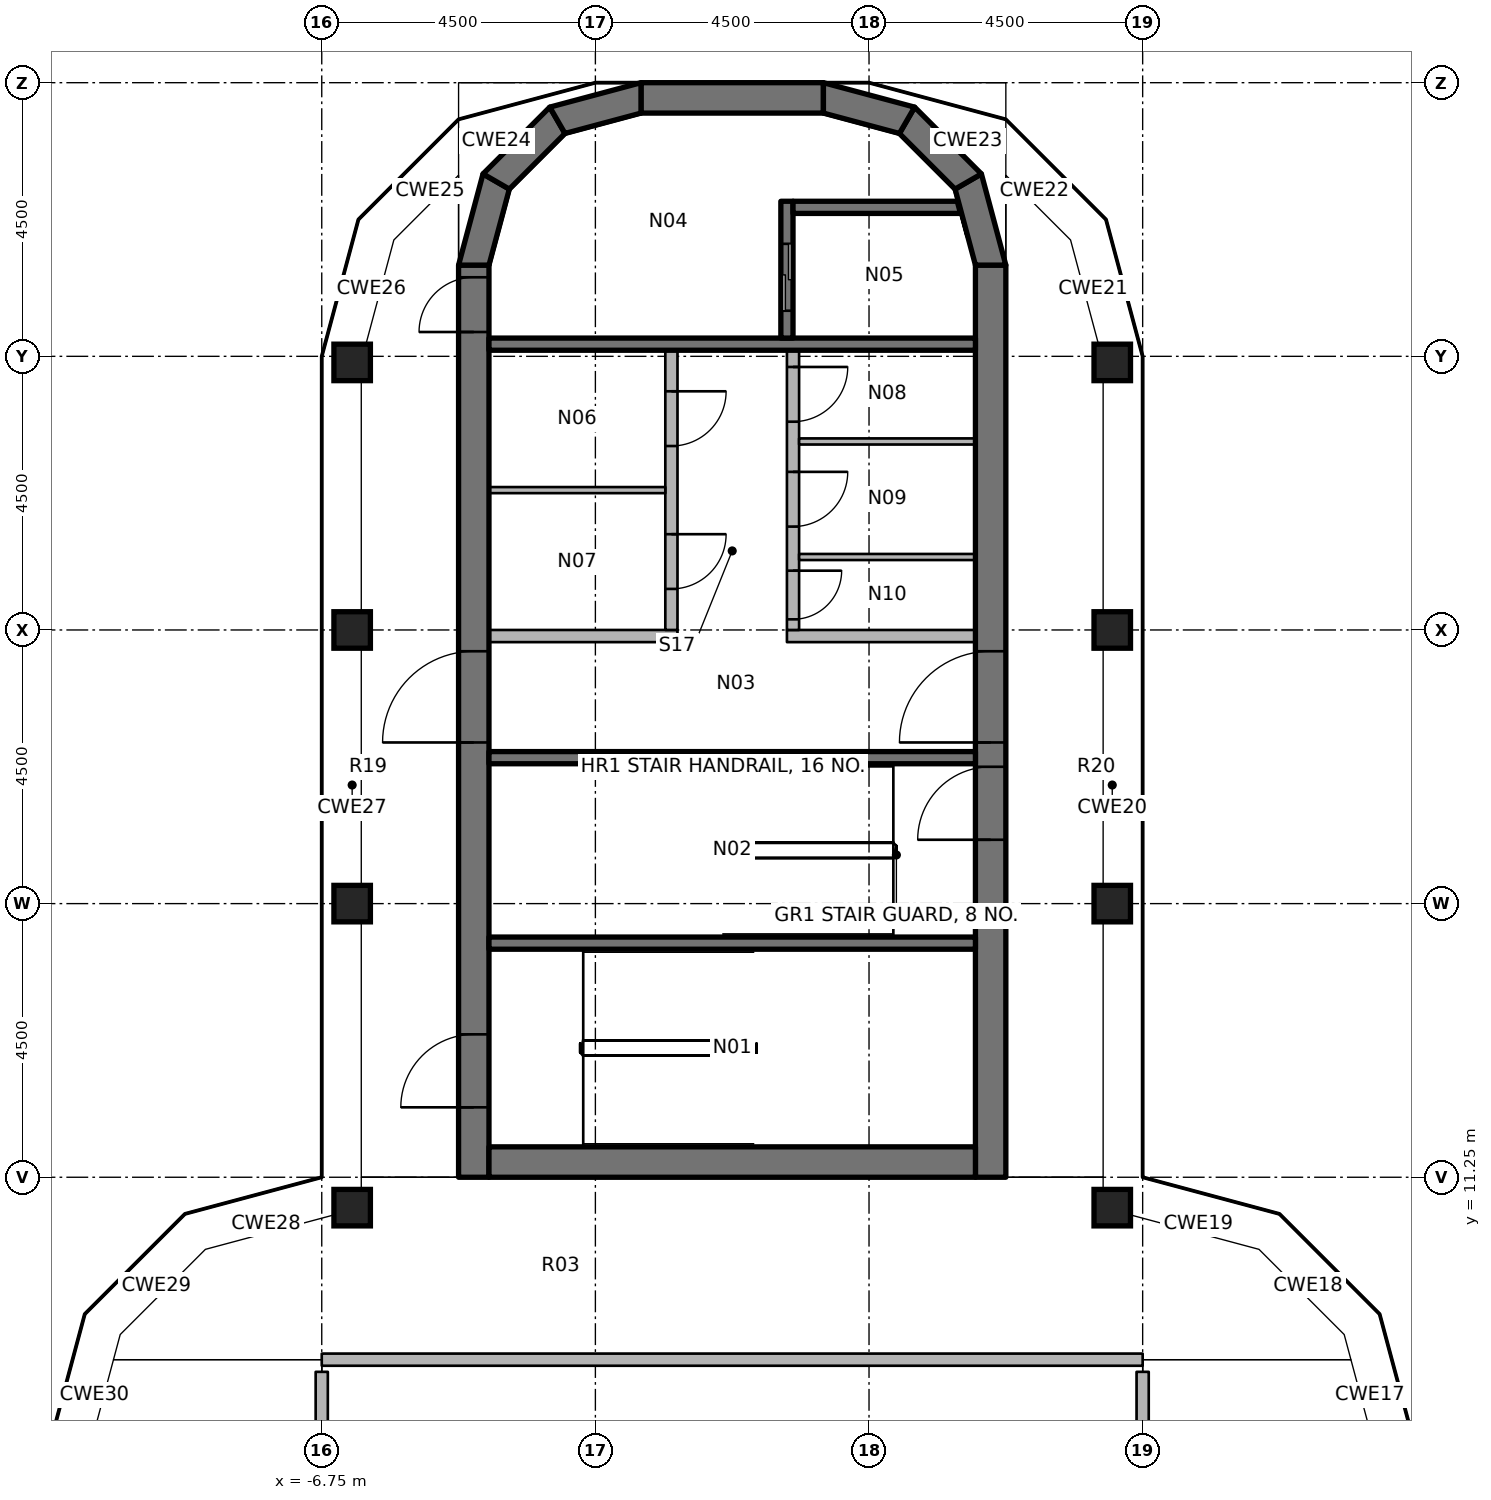
"""IFC4 building model, lengths in metres.
Left out: names, types, materials, properties, quantities, classifications, styles, units other than length and angle.
Written with IfcOpenShell. Run it as: python <this file> out.ifc"""

import sys

from ifc_helpers import new_model, si_unit, direction, frame, frame_2d, origin, origin_2d, place, context, subcontext, project, spatial, polyline, rectangle, outline, extrude, element, fill, save


model = new_model("IFC4")
c1 = context("Model", 3, precision=1e-05, world=origin(), true_north=direction((0.0, 1.0)))
c2 = subcontext(c1, "Body", "Model", "MODEL_VIEW")
j1 = project(units=[si_unit("LENGTHUNIT", "METRE"), si_unit("PLANEANGLEUNIT", "RADIAN")], contexts=[c1])
p1 = place(None, origin())
s1 = spatial("IfcSite", under=j1, at=p1, CompositionType="ELEMENT")
p2 = place(p1, origin())
s2 = spatial("IfcBuilding", under=s1, at=p2, CompositionType="ELEMENT")
p3 = place(p2, frame((0.0, 0.0, 284.0)))
s3 = spatial("IfcBuildingStorey", under=s2, at=p3, CompositionType="ELEMENT", Elevation=284.0)
for number, where, z_axis, x_axis in (
    (1, (-6.25, 10.75, 0.0), (0.0, 0.0, 1.0), (1.0, 0.0, 0.0)),
    (2, (-6.25, 15.75, 0.0), (0.0, 0.0, 1.0), (1.0, 0.0, 0.0)),
    (3, (-6.25, 20.25, 0.0), (0.0, 0.0, 1.0), (1.0, 0.0, 0.0)),
    (4, (-6.25, 24.65, 0.0), (0.0, 0.0, 1.0), (1.0, 0.0, 0.0)),
    (5, (6.25, 10.75, 0.0), (0.0, 0.0, 1.0), (1.0, 0.0, 0.0)),
    (6, (6.25, 15.75, 0.0), (0.0, 0.0, 1.0), (1.0, 0.0, 0.0)),
    (7, (6.25, 20.25, 0.0), (0.0, 0.0, 1.0), (1.0, 0.0, 0.0)),
    (8, (6.25, 24.65, 0.0), (0.0, 0.0, 1.0), (1.0, 0.0, 0.0)),
):
    element("IfcColumn", number, at=place(p3, frame(where, z_axis=z_axis, x_axis=x_axis)), inside=s3, PredefinedType="COLUMN", context=c2, shape_type="SweptSolid", body=[
        extrude(rectangle(XDim=0.6, YDim=0.6, at=origin_2d()), origin(), (0.0, 0.0, 1.0), 7.45),
    ])
p4 = place(p3, frame((-4.25, 11.25, 0.0), z_axis=(0.0, 0.0, 1.0), x_axis=(0.0, 1.0, 0.0)))
e9 = element("IfcWall", 9, at=p4, inside=s3, PredefinedType="SHEAR", context=c2, shape_type="SweptSolid", body=[
    extrude(rectangle(XDim=15.0, YDim=0.5, at=frame_2d((7.5, 0.0))), origin(), (0.0, 0.0, 1.0), 7.6),
])
p5 = place(p4, frame((7.15, 0.0, 0.0)))
e10 = element("IfcOpeningElement", 10, at=p5, cuts=e9, PredefinedType="OPENING", context=c2, shape_type="SweptSolid", body=[
    extrude(rectangle(XDim=1.5, YDim=2.3, at=frame_2d((0.75, 1.15))), frame((0.0, 0.26, 0.0), z_axis=(0.0, -1.0, 0.0), x_axis=(1.0, 0.0, 0.0)), (0.0, 0.0, 1.0), 0.52),
])
p6 = place(p4, frame((13.9, 0.0, 0.0)))
e11 = element("IfcOpeningElement", 11, at=p6, cuts=e9, PredefinedType="OPENING", context=c2, shape_type="SweptSolid", body=[
    extrude(rectangle(XDim=0.9, YDim=2.1, at=frame_2d((0.45, 1.05))), frame((0.0, 0.26, 0.0), z_axis=(0.0, -1.0, 0.0), x_axis=(1.0, 0.0, 0.0)), (0.0, 0.0, 1.0), 0.52),
])
p7 = place(p4, frame((1.15, 0.0, 0.0)))
e12 = element("IfcOpeningElement", 12, at=p7, cuts=e9, PredefinedType="OPENING", context=c2, shape_type="SweptSolid", body=[
    extrude(rectangle(XDim=1.2, YDim=2.1, at=frame_2d((0.6, 1.05))), frame((0.0, 0.26, 0.0), z_axis=(0.0, -1.0, 0.0), x_axis=(1.0, 0.0, 0.0)), (0.0, 0.0, 1.0), 0.52),
])
p8 = place(p3, frame((4.25, 11.25, 0.0), z_axis=(0.0, 0.0, 1.0), x_axis=(0.0, 1.0, 0.0)))
e13 = element("IfcWall", 13, at=p8, inside=s3, PredefinedType="SHEAR", context=c2, shape_type="SweptSolid", body=[
    extrude(rectangle(XDim=15.0, YDim=0.5, at=frame_2d((7.5, 0.0))), origin(), (0.0, 0.0, 1.0), 7.6),
])
p9 = place(p8, frame((7.15, 0.0, 0.0)))
e14 = element("IfcOpeningElement", 14, at=p9, cuts=e13, PredefinedType="OPENING", context=c2, shape_type="SweptSolid", body=[
    extrude(rectangle(XDim=1.5, YDim=2.3, at=frame_2d((0.75, 1.15))), frame((0.0, 0.26, 0.0), z_axis=(0.0, -1.0, 0.0), x_axis=(1.0, 0.0, 0.0)), (0.0, 0.0, 1.0), 0.52),
])
p10 = place(p8, frame((5.55, 0.0, 0.0)))
e15 = element("IfcOpeningElement", 15, at=p10, cuts=e13, PredefinedType="OPENING", context=c2, shape_type="SweptSolid", body=[
    extrude(rectangle(XDim=1.2, YDim=2.1, at=frame_2d((0.6, 1.05))), frame((0.0, 0.26, 0.0), z_axis=(0.0, -1.0, 0.0), x_axis=(1.0, 0.0, 0.0)), (0.0, 0.0, 1.0), 0.52),
])
p11 = place(p3, frame((-4.0, 11.5, 0.0), z_axis=(0.0, 0.0, 1.0), x_axis=(1.0, 0.0, 0.0)))
e16 = element("IfcWall", 16, at=p11, inside=s3, PredefinedType="SHEAR", context=c2, shape_type="SweptSolid", body=[
    extrude(rectangle(XDim=8.0, YDim=0.5, at=frame_2d((4.0, 0.0))), origin(), (0.0, 0.0, 1.0), 7.6),
])
p12 = place(p3, frame((-1.5, 29.0, 0.0), z_axis=(0.0, 0.0, 1.0), x_axis=(1.0, 0.0, 0.0)))
e17 = element("IfcWall", 17, at=p12, inside=s3, PredefinedType="SHEAR", context=c2, shape_type="SweptSolid", body=[
    extrude(rectangle(XDim=3.0, YDim=0.5, at=frame_2d((1.5, 0.0))), origin(), (0.0, 0.0, 1.0), 7.6),
])
p13 = place(p3, origin())
e18 = element("IfcWall", 18, at=p13, inside=s3, PredefinedType="SHEAR", context=c2, shape_type="SweptSolid", body=[
    extrude(outline(polyline([(-4.5, 26.25), (-4.098, 27.75), (-3.665, 27.5), (-4.0, 26.25), (-4.5, 26.25)])), origin(), (0.0, 0.0, 1.0), 7.6),
])
p14 = place(p3, origin())
e19 = element("IfcWall", 19, at=p14, inside=s3, PredefinedType="SHEAR", context=c2, shape_type="SweptSolid", body=[
    extrude(outline(polyline([(-4.098, 27.75), (-3.0, 28.848), (-2.75, 28.415), (-3.665, 27.5), (-4.098, 27.75)])), origin(), (0.0, 0.0, 1.0), 7.6),
])
p15 = place(p3, origin())
e20 = element("IfcWall", 20, at=p15, inside=s3, PredefinedType="SHEAR", context=c2, shape_type="SweptSolid", body=[
    extrude(outline(polyline([(-3.0, 28.848), (-1.5, 29.25), (-1.5, 28.75), (-2.75, 28.415), (-3.0, 28.848)])), origin(), (0.0, 0.0, 1.0), 7.6),
])
p16 = place(p3, origin())
e21 = element("IfcWall", 21, at=p16, inside=s3, PredefinedType="SHEAR", context=c2, shape_type="SweptSolid", body=[
    extrude(outline(polyline([(4.5, 26.25), (4.098, 27.75), (3.665, 27.5), (4.0, 26.25), (4.5, 26.25)])), origin(), (0.0, 0.0, 1.0), 7.6),
])
p17 = place(p3, origin())
e22 = element("IfcWall", 22, at=p17, inside=s3, PredefinedType="SHEAR", context=c2, shape_type="SweptSolid", body=[
    extrude(outline(polyline([(4.098, 27.75), (3.0, 28.848), (2.75, 28.415), (3.665, 27.5), (4.098, 27.75)])), origin(), (0.0, 0.0, 1.0), 7.6),
])
p18 = place(p3, origin())
e23 = element("IfcWall", 23, at=p18, inside=s3, PredefinedType="SHEAR", context=c2, shape_type="SweptSolid", body=[
    extrude(outline(polyline([(3.0, 28.848), (1.5, 29.25), (1.5, 28.75), (2.75, 28.415), (3.0, 28.848)])), origin(), (0.0, 0.0, 1.0), 7.6),
])
p19 = place(p3, frame((-4.0, 24.95, 0.0), z_axis=(0.0, 0.0, 1.0), x_axis=(1.0, 0.0, 0.0)))
e24 = element("IfcWall", 24, at=p19, inside=s3, PredefinedType="SHEAR", context=c2, shape_type="SweptSolid", body=[
    extrude(rectangle(XDim=8.0, YDim=0.2, at=frame_2d((4.0, 0.0))), origin(), (0.0, 0.0, 1.0), 7.45),
])
p20 = place(p3, frame((0.9, 27.3, 0.0), z_axis=(0.0, 0.0, 1.0), x_axis=(0.0, -1.0, 0.0)))
e25 = element("IfcWall", 25, at=p20, inside=s3, PredefinedType="SHEAR", context=c2, shape_type="SweptSolid", body=[
    extrude(rectangle(XDim=2.25, YDim=0.2, at=frame_2d((1.125, 0.0))), origin(), (0.0, 0.0, 1.0), 7.45),
])
p21 = place(p20, frame((0.7, 0.0, 0.0)))
e26 = element("IfcOpeningElement", 26, at=p21, cuts=e25, PredefinedType="OPENING", context=c2, shape_type="SweptSolid", body=[
    extrude(rectangle(XDim=1.1, YDim=2.3, at=frame_2d((0.55, 1.15))), frame((0.0, 0.11, 0.0), z_axis=(0.0, -1.0, 0.0), x_axis=(1.0, 0.0, 0.0)), (0.0, 0.0, 1.0), 0.22),
])
p22 = place(p3, origin())
e27 = element("IfcWall", 27, at=p22, inside=s3, PredefinedType="SHEAR", context=c2, shape_type="SweptSolid", body=[
    extrude(outline(polyline([(1.0, 27.1), (3.755, 27.1), (3.701, 27.3), (1.0, 27.3), (1.0, 27.1)])), origin(), (0.0, 0.0, 1.0), 7.45),
])
for number, where, z_axis, x_axis in (
    (28, (-4.0, 18.15, 0.0), (0.0, 0.0, 1.0), (1.0, 0.0, 0.0)),
    (29, (-4.0, 15.1, 0.0), (0.0, 0.0, 1.0), (1.0, 0.0, 0.0)),
):
    element("IfcWall", number, at=place(p3, frame(where, z_axis=z_axis, x_axis=x_axis)), inside=s3, PredefinedType="SHEAR", context=c2, shape_type="SweptSolid", body=[
        extrude(rectangle(XDim=8.0, YDim=0.2, at=frame_2d((4.0, 0.0))), origin(), (0.0, 0.0, 1.0), 7.45),
    ])
p23 = place(p3, frame((-4.0, 20.15, 0.0), z_axis=(0.0, 0.0, 1.0), x_axis=(1.0, 0.0, 0.0)))
e30 = element("IfcWall", 30, at=p23, inside=s3, PredefinedType="PARTITIONING", context=c2, shape_type="SweptSolid", body=[
    extrude(rectangle(XDim=3.1, YDim=0.2, at=frame_2d((1.55, 0.0))), origin(), (0.0, 0.0, 1.0), 7.45),
])
p24 = place(p3, frame((-1.0, 24.85, 0.0), z_axis=(0.0, 0.0, 1.0), x_axis=(0.0, -1.0, 0.0)))
e31 = element("IfcWall", 31, at=p24, inside=s3, PredefinedType="PARTITIONING", context=c2, shape_type="SweptSolid", body=[
    extrude(rectangle(XDim=4.6, YDim=0.2, at=frame_2d((2.3, 0.0))), origin(), (0.0, 0.0, 1.0), 7.45),
])
p25 = place(p24, frame((0.675, 0.0, 0.0)))
e32 = element("IfcOpeningElement", 32, at=p25, cuts=e31, PredefinedType="OPENING", context=c2, shape_type="SweptSolid", body=[
    extrude(rectangle(XDim=0.9, YDim=2.1, at=frame_2d((0.45, 1.05))), frame((0.0, 0.11, 0.0), z_axis=(0.0, -1.0, 0.0), x_axis=(1.0, 0.0, 0.0)), (0.0, 0.0, 1.0), 0.22),
])
p26 = place(p24, frame((3.025, 0.0, 0.0)))
e33 = element("IfcOpeningElement", 33, at=p26, cuts=e31, PredefinedType="OPENING", context=c2, shape_type="SweptSolid", body=[
    extrude(rectangle(XDim=0.9, YDim=2.1, at=frame_2d((0.45, 1.05))), frame((0.0, 0.11, 0.0), z_axis=(0.0, -1.0, 0.0), x_axis=(1.0, 0.0, 0.0)), (0.0, 0.0, 1.0), 0.22),
])
p27 = place(p3, frame((0.9, 20.15, 0.0), z_axis=(0.0, 0.0, 1.0), x_axis=(1.0, 0.0, 0.0)))
e34 = element("IfcWall", 34, at=p27, inside=s3, PredefinedType="PARTITIONING", context=c2, shape_type="SweptSolid", body=[
    extrude(rectangle(XDim=3.1, YDim=0.2, at=frame_2d((1.55, 0.0))), origin(), (0.0, 0.0, 1.0), 7.45),
])
p28 = place(p3, frame((1.0, 24.85, 0.0), z_axis=(0.0, 0.0, 1.0), x_axis=(0.0, -1.0, 0.0)))
e35 = element("IfcWall", 35, at=p28, inside=s3, PredefinedType="PARTITIONING", context=c2, shape_type="SweptSolid", body=[
    extrude(rectangle(XDim=4.6, YDim=0.2, at=frame_2d((2.3, 0.0))), origin(), (0.0, 0.0, 1.0), 7.45),
])
p29 = place(p28, frame((0.275, 0.0, 0.0)))
e36 = element("IfcOpeningElement", 36, at=p29, cuts=e35, PredefinedType="OPENING", context=c2, shape_type="SweptSolid", body=[
    extrude(rectangle(XDim=0.9, YDim=2.1, at=frame_2d((0.45, 1.05))), frame((0.0, 0.11, 0.0), z_axis=(0.0, -1.0, 0.0), x_axis=(1.0, 0.0, 0.0)), (0.0, 0.0, 1.0), 0.22),
])
p30 = place(p28, frame((2.0, 0.0, 0.0)))
e37 = element("IfcOpeningElement", 37, at=p30, cuts=e35, PredefinedType="OPENING", context=c2, shape_type="SweptSolid", body=[
    extrude(rectangle(XDim=0.9, YDim=2.1, at=frame_2d((0.45, 1.05))), frame((0.0, 0.11, 0.0), z_axis=(0.0, -1.0, 0.0), x_axis=(1.0, 0.0, 0.0)), (0.0, 0.0, 1.0), 0.22),
])
p31 = place(p28, frame((3.625, 0.0, 0.0)))
e38 = element("IfcOpeningElement", 38, at=p31, cuts=e35, PredefinedType="OPENING", context=c2, shape_type="SweptSolid", body=[
    extrude(rectangle(XDim=0.8, YDim=2.1, at=frame_2d((0.4, 1.05))), frame((0.0, 0.11, 0.0), z_axis=(0.0, -1.0, 0.0), x_axis=(1.0, 0.0, 0.0)), (0.0, 0.0, 1.0), 0.22),
])
for number, where, z_axis, x_axis in (
    (39, (-4.0, 22.55, 0.0), (0.0, 0.0, 1.0), (1.0, 0.0, 0.0)),
    (40, (1.1, 23.35, 0.0), (0.0, 0.0, 1.0), (1.0, 0.0, 0.0)),
    (41, (1.1, 21.45, 0.0), (0.0, 0.0, 1.0), (1.0, 0.0, 0.0)),
):
    element("IfcWall", number, at=place(p3, frame(where, z_axis=z_axis, x_axis=x_axis)), inside=s3, PredefinedType="PARTITIONING", context=c2, shape_type="SweptSolid", body=[
        extrude(rectangle(XDim=2.9, YDim=0.1, at=frame_2d((1.45, 0.0))), origin(), (0.0, 0.0, 1.0), 7.45),
    ])
p32 = place(p3, frame((-6.75, 8.25, 0.0), z_axis=(0.0, 0.0, 1.0), x_axis=(1.0, 0.0, 0.0)))
e42 = element("IfcWall", 42, at=p32, inside=s3, PredefinedType="PARTITIONING", context=c2, shape_type="SweptSolid", body=[
    extrude(rectangle(XDim=13.5, YDim=0.2, at=frame_2d((6.75, 0.0))), origin(), (0.0, 0.0, 1.0), 7.45),
])
for number, where, z_axis, x_axis in (
    (43, (-6.75, 2.25, 0.0), (0.0, 0.0, 1.0), (0.0, 1.0, 0.0)),
    (44, (6.75, 8.05, 0.0), (0.0, 0.0, 1.0), (0.0, -1.0, 0.0)),
):
    element("IfcWall", number, at=place(p3, frame(where, z_axis=z_axis, x_axis=x_axis)), inside=s3, PredefinedType="PARTITIONING", context=c2, shape_type="SweptSolid", body=[
        extrude(rectangle(XDim=5.8, YDim=0.2, at=frame_2d((2.9, 0.0))), origin(), (0.0, 0.0, 1.0), 6.681),
    ])
p33 = place(p5, origin())
e45 = element("IfcDoor", 45, at=p33, inside=s3, OperationType="DOUBLE_DOOR_SINGLE_SWING", PredefinedType="DOOR", context=c2, shape_type="SweptSolid", body=[
    extrude(rectangle(XDim=1.5, YDim=2.3, at=frame_2d((0.75, 1.15))), frame((0.0, 0.025, 0.0), z_axis=(0.0, -1.0, 0.0), x_axis=(1.0, 0.0, 0.0)), (0.0, 0.0, 1.0), 0.05),
])
fill(e10, e45)
p34 = place(p9, origin())
e46 = element("IfcDoor", 46, at=p34, inside=s3, OperationType="DOUBLE_DOOR_SINGLE_SWING", PredefinedType="DOOR", context=c2, shape_type="SweptSolid", body=[
    extrude(rectangle(XDim=1.5, YDim=2.3, at=frame_2d((0.75, 1.15))), frame((0.0, 0.025, 0.0), z_axis=(0.0, -1.0, 0.0), x_axis=(1.0, 0.0, 0.0)), (0.0, 0.0, 1.0), 0.05),
])
fill(e14, e46)
p35 = place(p6, origin())
e47 = element("IfcDoor", 47, at=p35, inside=s3, OperationType="SINGLE_SWING_RIGHT", PredefinedType="DOOR", context=c2, shape_type="SweptSolid", body=[
    extrude(rectangle(XDim=0.9, YDim=2.1, at=frame_2d((0.45, 1.05))), frame((0.0, 0.025, 0.0), z_axis=(0.0, -1.0, 0.0), x_axis=(1.0, 0.0, 0.0)), (0.0, 0.0, 1.0), 0.05),
])
fill(e11, e47)
p36 = place(p10, origin())
e48 = element("IfcDoor", 48, at=p36, inside=s3, OperationType="SINGLE_SWING_LEFT", PredefinedType="DOOR", context=c2, shape_type="SweptSolid", body=[
    extrude(rectangle(XDim=1.2, YDim=2.1, at=frame_2d((0.6, 1.05))), frame((0.0, 0.025, 0.0), z_axis=(0.0, -1.0, 0.0), x_axis=(1.0, 0.0, 0.0)), (0.0, 0.0, 1.0), 0.05),
])
fill(e15, e48)
p37 = place(p7, origin())
e49 = element("IfcDoor", 49, at=p37, inside=s3, OperationType="SINGLE_SWING_LEFT", PredefinedType="DOOR", context=c2, shape_type="SweptSolid", body=[
    extrude(rectangle(XDim=1.2, YDim=2.1, at=frame_2d((0.6, 1.05))), frame((0.0, 0.025, 0.0), z_axis=(0.0, -1.0, 0.0), x_axis=(1.0, 0.0, 0.0)), (0.0, 0.0, 1.0), 0.05),
])
fill(e12, e49)
p38 = place(p21, origin())
e50 = element("IfcDoor", 50, at=p38, inside=s3, OperationType="DOUBLE_DOOR_SLIDING", PredefinedType="DOOR", context=c2, shape_type="SweptSolid", body=[
    extrude(rectangle(XDim=1.1, YDim=2.3, at=frame_2d((0.55, 1.15))), frame((0.0, 0.025, 0.0), z_axis=(0.0, -1.0, 0.0), x_axis=(1.0, 0.0, 0.0)), (0.0, 0.0, 1.0), 0.05),
])
fill(e26, e50)
p39 = place(p25, origin())
e51 = element("IfcDoor", 51, at=p39, inside=s3, OperationType="SINGLE_SWING_LEFT", PredefinedType="DOOR", context=c2, shape_type="SweptSolid", body=[
    extrude(rectangle(XDim=0.9, YDim=2.1, at=frame_2d((0.45, 1.05))), frame((0.0, 0.025, 0.0), z_axis=(0.0, -1.0, 0.0), x_axis=(1.0, 0.0, 0.0)), (0.0, 0.0, 1.0), 0.05),
])
fill(e32, e51)
p40 = place(p26, origin())
e52 = element("IfcDoor", 52, at=p40, inside=s3, OperationType="SINGLE_SWING_RIGHT", PredefinedType="DOOR", context=c2, shape_type="SweptSolid", body=[
    extrude(rectangle(XDim=0.9, YDim=2.1, at=frame_2d((0.45, 1.05))), frame((0.0, 0.025, 0.0), z_axis=(0.0, -1.0, 0.0), x_axis=(1.0, 0.0, 0.0)), (0.0, 0.0, 1.0), 0.05),
])
fill(e33, e52)
p41 = place(p29, origin())
e53 = element("IfcDoor", 53, at=p41, inside=s3, OperationType="SINGLE_SWING_LEFT", PredefinedType="DOOR", context=c2, shape_type="SweptSolid", body=[
    extrude(rectangle(XDim=0.9, YDim=2.1, at=frame_2d((0.45, 1.05))), frame((0.0, 0.025, 0.0), z_axis=(0.0, -1.0, 0.0), x_axis=(1.0, 0.0, 0.0)), (0.0, 0.0, 1.0), 0.05),
])
fill(e36, e53)
p42 = place(p30, origin())
e54 = element("IfcDoor", 54, at=p42, inside=s3, OperationType="SINGLE_SWING_RIGHT", PredefinedType="DOOR", context=c2, shape_type="SweptSolid", body=[
    extrude(rectangle(XDim=0.9, YDim=2.1, at=frame_2d((0.45, 1.05))), frame((0.0, 0.025, 0.0), z_axis=(0.0, -1.0, 0.0), x_axis=(1.0, 0.0, 0.0)), (0.0, 0.0, 1.0), 0.05),
])
fill(e37, e54)
p43 = place(p31, origin())
e55 = element("IfcDoor", 55, at=p43, inside=s3, OperationType="SINGLE_SWING_LEFT", PredefinedType="DOOR", context=c2, shape_type="SweptSolid", body=[
    extrude(rectangle(XDim=0.8, YDim=2.1, at=frame_2d((0.4, 1.05))), frame((0.0, 0.025, 0.0), z_axis=(0.0, -1.0, 0.0), x_axis=(1.0, 0.0, 0.0)), (0.0, 0.0, 1.0), 0.05),
])
fill(e38, e55)
save(model, sys.argv[1])
